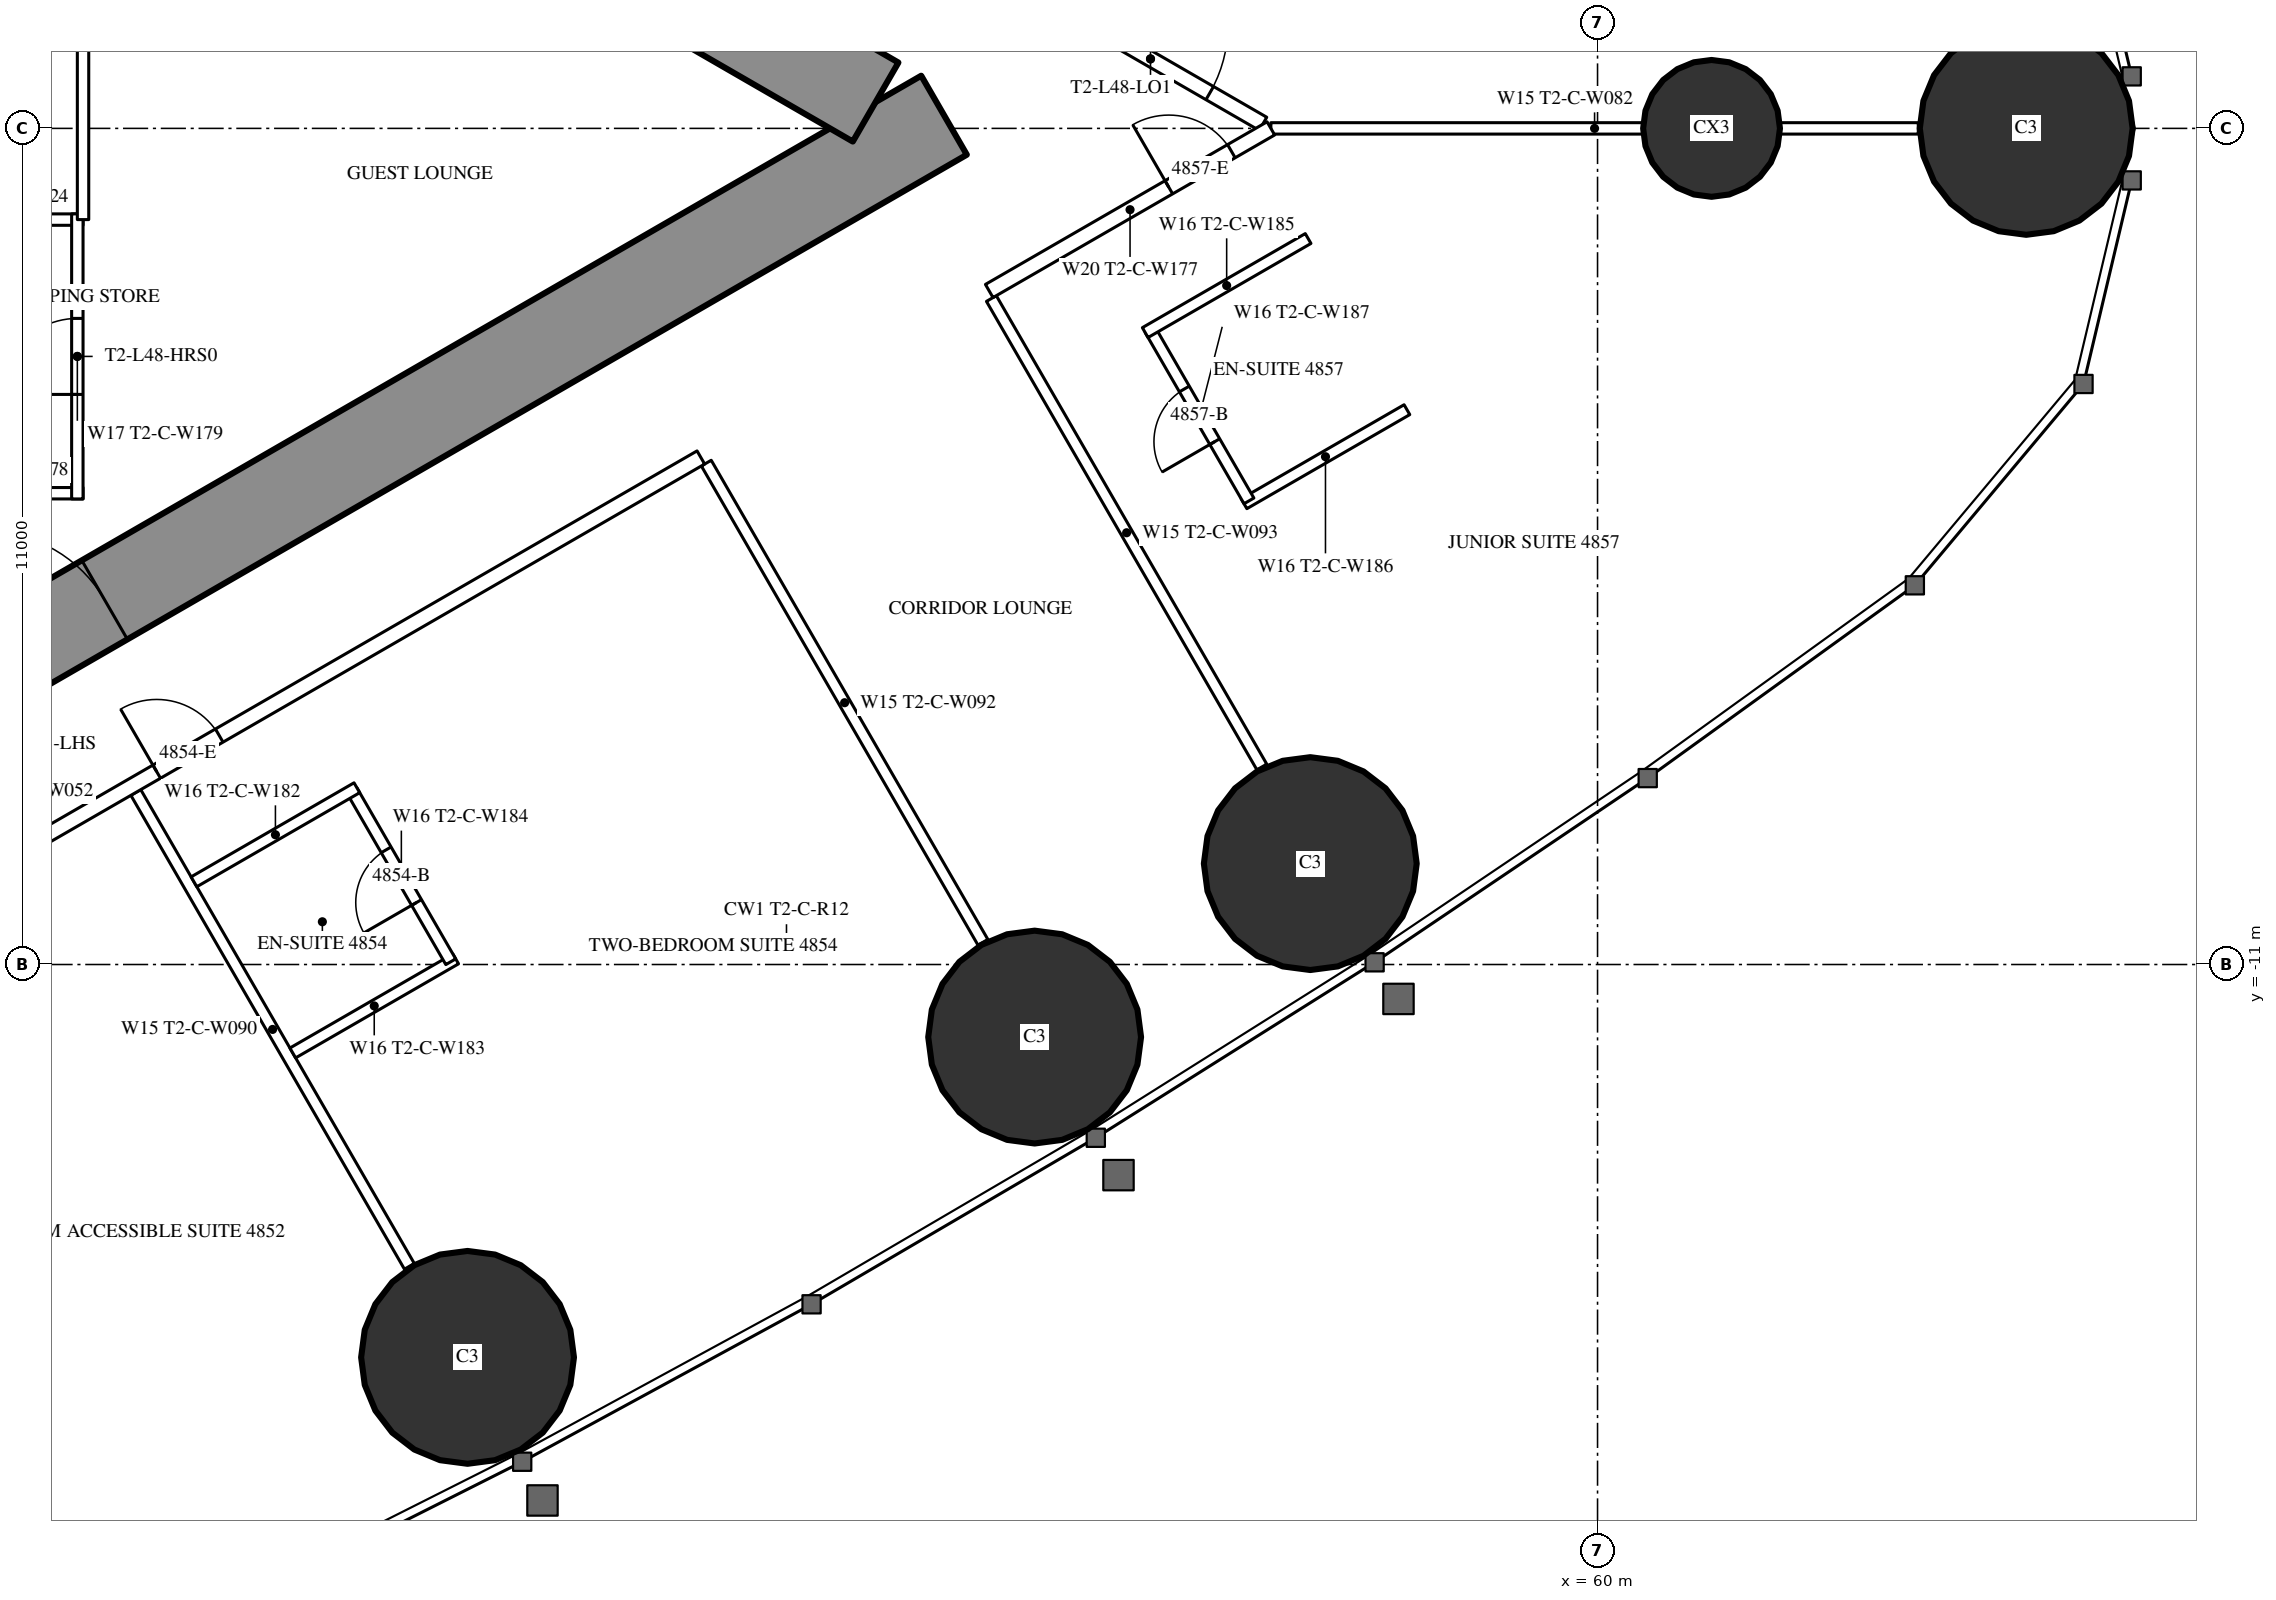
"""IFC4 building model, lengths in metres.
Left out: names, types, materials, properties, quantities, classifications, styles, units other than length and angle.
Written with IfcOpenShell. Run it as: python <this file> out.ifc"""

import sys

from ifc_helpers import new_model, si_unit, direction, frame, frame_2d, origin, origin_2d, place, context, subcontext, project, spatial, rectangle, circle, extrude, element, fill, save


model = new_model("IFC4")
c1 = context("Model", 3, precision=1e-05, world=origin(), true_north=direction((0.0, 1.0)))
c2 = subcontext(c1, "Body", "Model", "MODEL_VIEW")
j1 = project(units=[si_unit("LENGTHUNIT", "METRE"), si_unit("PLANEANGLEUNIT", "RADIAN")], contexts=[c1])
p1 = place(None, origin())
s1 = spatial("IfcSite", under=j1, at=p1, CompositionType="ELEMENT")
p2 = place(p1, origin())
s2 = spatial("IfcBuilding", under=s1, at=p2, CompositionType="ELEMENT")
p3 = place(p2, frame((0.0, 0.0, 180.8)))
s3 = spatial("IfcBuildingStorey", under=s2, at=p3, CompositionType="ELEMENT", Elevation=180.8)
for number, where, z_axis, x_axis in (
    (1, (65.64, 0.0, 0.0), (0.0, 0.0, 1.0), (1.0, 0.0, 0.0)),
    (2, (45.134, -16.168, 0.0), (0.0, 0.0, 1.0), (1.0, 0.0, 0.0)),
    (3, (52.594, -11.955, 0.0), (0.0, 0.0, 1.0), (1.0, 0.0, 0.0)),
    (4, (56.221, -9.672, 0.0), (0.0, 0.0, 1.0), (1.0, 0.0, 0.0)),
):
    element("IfcColumn", number, at=place(p3, frame(where, z_axis=z_axis, x_axis=x_axis)), inside=s3, PredefinedType="COLUMN", context=c2, shape_type="SweptSolid", body=[
        extrude(circle(Radius=1.4, at=origin_2d()), origin(), (0.0, 0.0, 1.0), 3.5),
    ])
p4 = place(p3, frame((61.5, 0.0, 0.0), z_axis=(0.0, 0.0, 1.0), x_axis=(1.0, 0.0, 0.0)))
e5 = element("IfcColumn", 5, at=p4, inside=s3, PredefinedType="COLUMN", context=c2, shape_type="SweptSolid", body=[
    extrude(circle(Radius=0.9, at=origin_2d()), origin(), (0.0, 0.0, 1.0), 3.5),
])
p5 = place(p3, frame((27.2, -13.8, 0.0), z_axis=(0.0, 0.0, 1.0), x_axis=(0.866027159892, 0.499996958321, 0.0)))
e6 = element("IfcWall", 6, at=p5, inside=s3, PredefinedType="SHEAR", context=c2, shape_type="SweptSolid", body=[
    extrude(rectangle(XDim=27.947, YDim=1.2, at=frame_2d((13.973, 0.0))), origin(), (0.0, 0.0, 1.0), 3.5),
])
p6 = place(p5, frame((4.6, 0.0, 0.0)))
e7 = element("IfcOpeningElement", 7, at=p6, cuts=e6, PredefinedType="OPENING", context=c2, shape_type="SweptSolid", body=[
    extrude(rectangle(XDim=1.0, YDim=2.2, at=frame_2d((0.5, 1.1))), frame((0.0, 0.61, 0.0), z_axis=(0.0, -1.0, 0.0), x_axis=(1.0, 0.0, 0.0)), (0.0, 0.0, 1.0), 1.22),
])
p7 = place(p5, frame((13.395, 0.0, 0.0)))
e8 = element("IfcOpeningElement", 8, at=p7, cuts=e6, PredefinedType="OPENING", context=c2, shape_type="SweptSolid", body=[
    extrude(rectangle(XDim=1.8, YDim=2.2, at=frame_2d((0.9, 1.1))), frame((0.0, 0.61, 0.0), z_axis=(0.0, -1.0, 0.0), x_axis=(1.0, 0.0, 0.0)), (0.0, 0.0, 1.0), 1.22),
])
p8 = place(p3, frame((27.2, 13.8, 0.0), z_axis=(0.0, 0.0, 1.0), x_axis=(0.866024515034, -0.500001539357, 0.0)))
e9 = element("IfcWall", 9, at=p8, inside=s3, PredefinedType="SHEAR", context=c2, shape_type="SweptSolid", body=[
    extrude(rectangle(XDim=26.907, YDim=1.2, at=frame_2d((13.454, 0.0))), origin(), (0.0, 0.0, 1.0), 3.5),
])
p9 = place(p8, frame((4.6, 0.0, 0.0)))
e10 = element("IfcOpeningElement", 10, at=p9, cuts=e9, PredefinedType="OPENING", context=c2, shape_type="SweptSolid", body=[
    extrude(rectangle(XDim=1.0, YDim=2.2, at=frame_2d((0.5, 1.1))), frame((0.0, 0.61, 0.0), z_axis=(0.0, -1.0, 0.0), x_axis=(1.0, 0.0, 0.0)), (0.0, 0.0, 1.0), 1.22),
])
p10 = place(p8, frame((13.395, 0.0, 0.0)))
e11 = element("IfcOpeningElement", 11, at=p10, cuts=e9, PredefinedType="OPENING", context=c2, shape_type="SweptSolid", body=[
    extrude(rectangle(XDim=1.8, YDim=2.2, at=frame_2d((0.9, 1.1))), frame((0.0, 0.61, 0.0), z_axis=(0.0, -1.0, 0.0), x_axis=(1.0, 0.0, 0.0)), (0.0, 0.0, 1.0), 1.22),
])
p11 = place(p3, frame((40.769, -8.737, 0.0), z_axis=(0.0, 0.0, 1.0), x_axis=(0.500013115284, -0.866017831539, 0.0)))
e12 = element("IfcWall", 12, at=p11, inside=s3, PredefinedType="PARTITIONING", context=c2, shape_type="SweptSolid", body=[
    extrude(rectangle(XDim=7.198, YDim=0.15, at=frame_2d((3.599, 0.0))), origin(), (0.0, 0.0, 1.0), 2.3),
])
p12 = place(p3, frame((48.275, -4.404, 0.0), z_axis=(0.0, 0.0, 1.0), x_axis=(0.500006004368, -0.866021937133, 0.0)))
e13 = element("IfcWall", 13, at=p12, inside=s3, PredefinedType="PARTITIONING", context=c2, shape_type="SweptSolid", body=[
    extrude(rectangle(XDim=7.279, YDim=0.15, at=frame_2d((3.64, 0.0))), origin(), (0.0, 0.0, 1.0), 2.3),
])
p13 = place(p3, frame((52.025, -2.238, 0.0), z_axis=(0.0, 0.0, 1.0), x_axis=(0.499983785035, -0.866034765296, 0.0)))
e14 = element("IfcWall", 14, at=p13, inside=s3, PredefinedType="PARTITIONING", context=c2, shape_type="SweptSolid", body=[
    extrude(rectangle(XDim=7.116, YDim=0.15, at=frame_2d((3.558, 0.0))), origin(), (0.0, 0.0, 1.0), 2.3),
])
p14 = place(p3, frame((55.702, 0.0, 0.0), z_axis=(0.0, 0.0, 1.0), x_axis=(1.0, 0.0, 0.0)))
e15 = element("IfcWall", 15, at=p14, inside=s3, PredefinedType="PARTITIONING", context=c2, shape_type="SweptSolid", body=[
    extrude(rectangle(XDim=8.518, YDim=0.15, at=frame_2d((4.259, 0.0))), origin(), (0.0, 0.0, 1.0), 2.3),
])
p15 = place(p3, frame((52.639, 1.769, 0.0), z_axis=(0.0, 0.0, 1.0), x_axis=(0.866027340901, -0.4999966448, 0.0)))
e16 = element("IfcWall", 16, at=p15, inside=s3, PredefinedType="PARTITIONING", context=c2, shape_type="SweptSolid", body=[
    extrude(rectangle(XDim=3.417, YDim=0.2, at=frame_2d((1.708, 0.0))), origin(), (0.0, 0.0, 1.0), 3.25),
])
p16 = place(p15, frame((0.809, 0.0, 0.0)))
e17 = element("IfcOpeningElement", 17, at=p16, cuts=e16, PredefinedType="OPENING", context=c2, shape_type="SweptSolid", body=[
    extrude(rectangle(XDim=1.8, YDim=2.2, at=frame_2d((0.9, 1.1))), frame((0.0, 0.11, 0.0), z_axis=(0.0, -1.0, 0.0), x_axis=(1.0, 0.0, 0.0)), (0.0, 0.0, 1.0), 0.22),
])
p17 = place(p3, frame((27.959, -16.017, 0.0), z_axis=(0.0, 0.0, 1.0), x_axis=(0.866024180982, 0.50000211795, 0.0)))
e18 = element("IfcWall", 18, at=p17, inside=s3, PredefinedType="PARTITIONING", context=c2, shape_type="SweptSolid", body=[
    extrude(rectangle(XDim=23.375, YDim=0.2, at=frame_2d((11.688, 0.0))), origin(), (0.0, 0.0, 1.0), 3.25),
])
p18 = place(p17, frame((2.415, 0.0, 0.0)))
e19 = element("IfcOpeningElement", 19, at=p18, cuts=e18, PredefinedType="OPENING", context=c2, shape_type="SweptSolid", body=[
    extrude(rectangle(XDim=0.95, YDim=2.2, at=frame_2d((0.475, 1.1))), frame((0.0, 0.11, 0.0), z_axis=(0.0, -1.0, 0.0), x_axis=(1.0, 0.0, 0.0)), (0.0, 0.0, 1.0), 0.22),
])
p19 = place(p17, frame((9.215, 0.0, 0.0)))
e20 = element("IfcOpeningElement", 20, at=p19, cuts=e18, PredefinedType="OPENING", context=c2, shape_type="SweptSolid", body=[
    extrude(rectangle(XDim=1.0, YDim=2.2, at=frame_2d((0.5, 1.1))), frame((0.0, 0.11, 0.0), z_axis=(0.0, -1.0, 0.0), x_axis=(1.0, 0.0, 0.0)), (0.0, 0.0, 1.0), 0.22),
])
p20 = place(p17, frame((15.109, 0.0, 0.0)))
e21 = element("IfcOpeningElement", 21, at=p20, cuts=e18, PredefinedType="OPENING", context=c2, shape_type="SweptSolid", body=[
    extrude(rectangle(XDim=0.95, YDim=2.2, at=frame_2d((0.475, 1.1))), frame((0.0, 0.11, 0.0), z_axis=(0.0, -1.0, 0.0), x_axis=(1.0, 0.0, 0.0)), (0.0, 0.0, 1.0), 0.22),
])
p21 = place(p3, frame((51.997, -2.139, 0.0), z_axis=(0.0, 0.0, 1.0), x_axis=(0.866036399848, 0.499980953776, 0.0)))
e22 = element("IfcWall", 22, at=p21, inside=s3, PredefinedType="PARTITIONING", context=c2, shape_type="SweptSolid", body=[
    extrude(rectangle(XDim=4.279, YDim=0.2, at=frame_2d((2.139, 0.0))), origin(), (0.0, 0.0, 1.0), 3.25),
])
p22 = place(p21, frame((2.729, 0.0, 0.0)))
e23 = element("IfcOpeningElement", 23, at=p22, cuts=e22, PredefinedType="OPENING", context=c2, shape_type="SweptSolid", body=[
    extrude(rectangle(XDim=0.95, YDim=2.2, at=frame_2d((0.475, 1.1))), frame((0.0, 0.11, 0.0), z_axis=(0.0, -1.0, 0.0), x_axis=(1.0, 0.0, 0.0)), (0.0, 0.0, 1.0), 0.22),
])
p23 = place(p3, frame((42.834, -12.164, 0.0), z_axis=(0.0, 0.0, 1.0), x_axis=(0.866031185235, 0.4999899861, 0.0)))
e24 = element("IfcWall", 24, at=p23, inside=s3, PredefinedType="PARTITIONING", context=c2, shape_type="SweptSolid", body=[
    extrude(rectangle(XDim=2.475, YDim=0.15, at=frame_2d((1.238, 0.0))), origin(), (0.0, 0.0, 1.0), 3.25),
])
p24 = place(p3, frame((43.613, -8.712, 0.0), z_axis=(0.0, 0.0, 1.0), x_axis=(0.500006934395, -0.866021400173, 0.0)))
e25 = element("IfcWall", 25, at=p24, inside=s3, PredefinedType="PARTITIONING", context=c2, shape_type="SweptSolid", body=[
    extrude(rectangle(XDim=2.6, YDim=0.15, at=frame_2d((1.3, 0.0))), origin(), (0.0, 0.0, 1.0), 3.25),
])
p25 = place(p24, frame((0.9, 0.0, 0.0)))
e26 = element("IfcOpeningElement", 26, at=p25, cuts=e25, PredefinedType="OPENING", context=c2, shape_type="SweptSolid", body=[
    extrude(rectangle(XDim=0.8, YDim=2.2, at=frame_2d((0.4, 1.1))), frame((0.0, 0.085, 0.0), z_axis=(0.0, -1.0, 0.0), x_axis=(1.0, 0.0, 0.0)), (0.0, 0.0, 1.0), 0.17),
])
p26 = place(p3, frame((41.534, -9.912, 0.0), z_axis=(0.0, 0.0, 1.0), x_axis=(0.866031185235, 0.4999899861, 0.0)))
e27 = element("IfcWall", 27, at=p26, inside=s3, PredefinedType="PARTITIONING", context=c2, shape_type="SweptSolid", body=[
    extrude(rectangle(XDim=2.475, YDim=0.15, at=frame_2d((1.238, 0.0))), origin(), (0.0, 0.0, 1.0), 3.25),
])
p27 = place(p3, frame((55.349, -4.938, 0.0), z_axis=(0.0, 0.0, 1.0), x_axis=(0.866006523861, 0.500032699561, 0.0)))
e28 = element("IfcWall", 28, at=p27, inside=s3, PredefinedType="PARTITIONING", context=c2, shape_type="SweptSolid", body=[
    extrude(rectangle(XDim=2.475, YDim=0.15, at=frame_2d((1.237, 0.0))), origin(), (0.0, 0.0, 1.0), 3.25),
])
p28 = place(p3, frame((54.114, -2.649, 0.0), z_axis=(0.0, 0.0, 1.0), x_axis=(0.500006934395, -0.866021400173, 0.0)))
e29 = element("IfcWall", 29, at=p28, inside=s3, PredefinedType="PARTITIONING", context=c2, shape_type="SweptSolid", body=[
    extrude(rectangle(XDim=2.6, YDim=0.15, at=frame_2d((1.3, 0.0))), origin(), (0.0, 0.0, 1.0), 3.25),
])
p29 = place(p28, frame((0.9, 0.0, 0.0)))
e30 = element("IfcOpeningElement", 30, at=p29, cuts=e29, PredefinedType="OPENING", context=c2, shape_type="SweptSolid", body=[
    extrude(rectangle(XDim=0.8, YDim=2.2, at=frame_2d((0.4, 1.1))), frame((0.0, 0.085, 0.0), z_axis=(0.0, -1.0, 0.0), x_axis=(1.0, 0.0, 0.0)), (0.0, 0.0, 1.0), 0.17),
])
p30 = place(p3, frame((54.049, -2.687, 0.0), z_axis=(0.0, 0.0, 1.0), x_axis=(0.866006523861, 0.500032699561, 0.0)))
e31 = element("IfcWall", 31, at=p30, inside=s3, PredefinedType="PARTITIONING", context=c2, shape_type="SweptSolid", body=[
    extrude(rectangle(XDim=2.475, YDim=0.15, at=frame_2d((1.237, 0.0))), origin(), (0.0, 0.0, 1.0), 3.25),
])
for number, where, z_axis, x_axis in (
    (32, (37.9, -1.2, 0.0), (0.0, 0.0, 1.0), (1.0, 0.0, 0.0)),
    (33, (37.9, -4.8, 0.0), (0.0, 0.0, 1.0), (1.0, 0.0, 0.0)),
):
    element("IfcWall", number, at=place(p3, frame(where, z_axis=z_axis, x_axis=x_axis)), inside=s3, PredefinedType="PARTITIONING", context=c2, shape_type="SweptSolid", body=[
        extrude(rectangle(XDim=2.175, YDim=0.15, at=frame_2d((1.087, 0.0))), origin(), (0.0, 0.0, 1.0), 3.25),
    ])
p31 = place(p3, frame((40.0, -4.875, 0.0), z_axis=(0.0, 0.0, 1.0), x_axis=(0.0, 1.0, 0.0)))
e34 = element("IfcWall", 34, at=p31, inside=s3, PredefinedType="PARTITIONING", context=c2, shape_type="SweptSolid", body=[
    extrude(rectangle(XDim=3.75, YDim=0.15, at=frame_2d((1.875, 0.0))), origin(), (0.0, 0.0, 1.0), 3.25),
])
p32 = place(p31, frame((1.375, 0.0, 0.0)))
e35 = element("IfcOpeningElement", 35, at=p32, cuts=e34, PredefinedType="OPENING", context=c2, shape_type="SweptSolid", body=[
    extrude(rectangle(XDim=1.0, YDim=2.2, at=frame_2d((0.5, 1.1))), frame((0.0, 0.085, 0.0), z_axis=(0.0, -1.0, 0.0), x_axis=(1.0, 0.0, 0.0)), (0.0, 0.0, 1.0), 0.17),
])
p33 = place(p3, frame((40.075, -1.2, 0.0), z_axis=(0.0, 0.0, 1.0), x_axis=(0.0, 1.0, 0.0)))
e36 = element("IfcWall", 36, at=p33, inside=s3, PredefinedType="PARTITIONING", context=c2, shape_type="SweptSolid", body=[
    extrude(rectangle(XDim=6.874, YDim=0.15, at=frame_2d((3.437, 0.0))), origin(), (0.0, 0.0, 1.0), 3.25),
])
p34 = place(p33, frame((2.537, 0.0, 0.0)))
e37 = element("IfcOpeningElement", 37, at=p34, cuts=e36, PredefinedType="OPENING", context=c2, shape_type="SweptSolid", body=[
    extrude(rectangle(XDim=1.8, YDim=2.2, at=frame_2d((0.9, 1.1))), frame((0.0, 0.085, 0.0), z_axis=(0.0, -1.0, 0.0), x_axis=(1.0, 0.0, 0.0)), (0.0, 0.0, 1.0), 0.17),
])
p35 = place(p25, origin())
e38 = element("IfcDoor", 38, at=p35, inside=s3, OperationType="SINGLE_SWING_RIGHT", PredefinedType="DOOR", context=c2, shape_type="SweptSolid", body=[
    extrude(rectangle(XDim=0.8, YDim=2.2, at=frame_2d((0.4, 1.1))), frame((0.0, 0.025, 0.0), z_axis=(0.0, -1.0, 0.0), x_axis=(1.0, 0.0, 0.0)), (0.0, 0.0, 1.0), 0.05),
])
fill(e26, e38)
p36 = place(p20, origin())
e39 = element("IfcDoor", 39, at=p36, inside=s3, OperationType="SINGLE_SWING_LEFT", PredefinedType="DOOR", context=c2, shape_type="SweptSolid", body=[
    extrude(rectangle(XDim=0.95, YDim=2.2, at=frame_2d((0.475, 1.1))), frame((0.0, 0.025, 0.0), z_axis=(0.0, -1.0, 0.0), x_axis=(1.0, 0.0, 0.0)), (0.0, 0.0, 1.0), 0.05),
])
fill(e21, e39)
p37 = place(p29, origin())
e40 = element("IfcDoor", 40, at=p37, inside=s3, OperationType="SINGLE_SWING_RIGHT", PredefinedType="DOOR", context=c2, shape_type="SweptSolid", body=[
    extrude(rectangle(XDim=0.8, YDim=2.2, at=frame_2d((0.4, 1.1))), frame((0.0, 0.025, 0.0), z_axis=(0.0, -1.0, 0.0), x_axis=(1.0, 0.0, 0.0)), (0.0, 0.0, 1.0), 0.05),
])
fill(e30, e40)
p38 = place(p22, origin())
e41 = element("IfcDoor", 41, at=p38, inside=s3, OperationType="SINGLE_SWING_LEFT", PredefinedType="DOOR", context=c2, shape_type="SweptSolid", body=[
    extrude(rectangle(XDim=0.95, YDim=2.2, at=frame_2d((0.475, 1.1))), frame((0.0, 0.025, 0.0), z_axis=(0.0, -1.0, 0.0), x_axis=(1.0, 0.0, 0.0)), (0.0, 0.0, 1.0), 0.05),
])
fill(e23, e41)
p39 = place(p16, origin())
e42 = element("IfcDoor", 42, at=p39, inside=s3, OperationType="DOUBLE_DOOR_SINGLE_SWING", PredefinedType="DOOR", context=c2, shape_type="SweptSolid", body=[
    extrude(rectangle(XDim=1.8, YDim=2.2, at=frame_2d((0.9, 1.1))), frame((0.0, 0.025, 0.0), z_axis=(0.0, -1.0, 0.0), x_axis=(1.0, 0.0, 0.0)), (0.0, 0.0, 1.0), 0.05),
])
fill(e17, e42)
p40 = place(p32, origin())
e43 = element("IfcDoor", 43, at=p40, inside=s3, OperationType="SINGLE_SWING_LEFT", PredefinedType="DOOR", context=c2, shape_type="SweptSolid", body=[
    extrude(rectangle(XDim=1.0, YDim=2.2, at=frame_2d((0.5, 1.1))), frame((0.0, 0.025, 0.0), z_axis=(0.0, -1.0, 0.0), x_axis=(1.0, 0.0, 0.0)), (0.0, 0.0, 1.0), 0.05),
])
fill(e35, e43)
p41 = place(p7, origin())
e44 = element("IfcDoor", 44, at=p41, inside=s3, OperationType="DOUBLE_DOOR_SINGLE_SWING", PredefinedType="DOOR", context=c2, shape_type="SweptSolid", body=[
    extrude(rectangle(XDim=1.8, YDim=2.2, at=frame_2d((0.9, 1.1))), frame((0.0, 0.025, 0.0), z_axis=(0.0, -1.0, 0.0), x_axis=(1.0, 0.0, 0.0)), (0.0, 0.0, 1.0), 0.05),
])
fill(e8, e44)
save(model, sys.argv[1])
